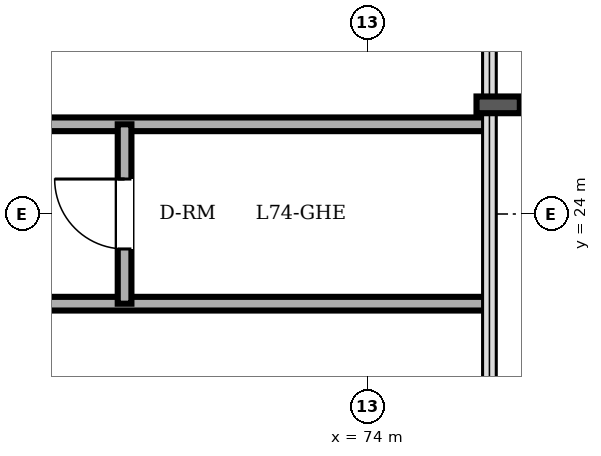
"""IFC4 building model, lengths in metres.
Left out: names, types, materials, properties, quantities, classifications, styles, units other than length and angle.
Written with IfcOpenShell. Run it as: python <this file> out.ifc"""

import sys

from ifc_helpers import new_model, si_unit, direction, frame, frame_2d, origin, place, context, subcontext, project, spatial, rectangle, extrude, element, fill, save


model = new_model("IFC4")
c1 = context("Model", 3, precision=1e-05, world=origin(), true_north=direction((0.0, 1.0)))
c2 = subcontext(c1, "Body", "Model", "MODEL_VIEW")
j1 = project(units=[si_unit("LENGTHUNIT", "METRE"), si_unit("PLANEANGLEUNIT", "RADIAN")], contexts=[c1])
p1 = place(None, origin())
s1 = spatial("IfcSite", under=j1, at=p1, CompositionType="ELEMENT")
p2 = place(p1, origin())
s2 = spatial("IfcBuilding", under=s1, at=p2, CompositionType="ELEMENT")
p3 = place(p2, frame((0.0, 0.0, 284.35)))
s3 = spatial("IfcBuildingStorey", under=s2, at=p3, CompositionType="ELEMENT", Elevation=284.35)
p4 = place(p3, frame((41.75, 22.82, 0.0), z_axis=(0.0, 0.0, 1.0), x_axis=(1.0, 0.0, 0.0)))
e1 = element("IfcWall", 1, at=p4, inside=s3, PredefinedType="PARTITIONING", context=c2, shape_type="SweptSolid", body=[
    extrude(rectangle(XDim=33.85, YDim=0.18, at=frame_2d((16.925, 0.0))), origin(), (0.0, 0.0, 1.0), 3.45),
])
p5 = place(p4, frame((2.53, 0.0, 0.0)))
e2 = element("IfcOpeningElement", 2, at=p5, cuts=e1, PredefinedType="OPENING", context=c2, shape_type="SweptSolid", body=[
    extrude(rectangle(XDim=0.92, YDim=2.1, at=frame_2d((0.46, 1.05))), frame((0.0, 0.1, 0.0), z_axis=(0.0, -1.0, 0.0), x_axis=(1.0, 0.0, 0.0)), (0.0, 0.0, 1.0), 0.2),
])
p6 = place(p4, frame((8.604, 0.0, 0.0)))
e3 = element("IfcOpeningElement", 3, at=p6, cuts=e1, PredefinedType="OPENING", context=c2, shape_type="SweptSolid", body=[
    extrude(rectangle(XDim=0.92, YDim=2.1, at=frame_2d((0.46, 1.05))), frame((0.0, 0.1, 0.0), z_axis=(0.0, -1.0, 0.0), x_axis=(1.0, 0.0, 0.0)), (0.0, 0.0, 1.0), 0.2),
])
p7 = place(p4, frame((14.065, 0.0, 0.0)))
e4 = element("IfcOpeningElement", 4, at=p7, cuts=e1, PredefinedType="OPENING", context=c2, shape_type="SweptSolid", body=[
    extrude(rectangle(XDim=0.92, YDim=2.1, at=frame_2d((0.46, 1.05))), frame((0.0, 0.1, 0.0), z_axis=(0.0, -1.0, 0.0), x_axis=(1.0, 0.0, 0.0)), (0.0, 0.0, 1.0), 0.2),
])
p8 = place(p4, frame((18.652, 0.0, 0.0)))
e5 = element("IfcOpeningElement", 5, at=p8, cuts=e1, PredefinedType="OPENING", context=c2, shape_type="SweptSolid", body=[
    extrude(rectangle(XDim=0.92, YDim=2.1, at=frame_2d((0.46, 1.05))), frame((0.0, 0.1, 0.0), z_axis=(0.0, -1.0, 0.0), x_axis=(1.0, 0.0, 0.0)), (0.0, 0.0, 1.0), 0.2),
])
p9 = place(p4, frame((24.986, 0.0, 0.0)))
e6 = element("IfcOpeningElement", 6, at=p9, cuts=e1, PredefinedType="OPENING", context=c2, shape_type="SweptSolid", body=[
    extrude(rectangle(XDim=0.92, YDim=2.1, at=frame_2d((0.46, 1.05))), frame((0.0, 0.1, 0.0), z_axis=(0.0, -1.0, 0.0), x_axis=(1.0, 0.0, 0.0)), (0.0, 0.0, 1.0), 0.2),
])
p10 = place(p3, frame((41.75, 25.18, 0.0), z_axis=(0.0, 0.0, 1.0), x_axis=(1.0, 0.0, 0.0)))
e7 = element("IfcWall", 7, at=p10, inside=s3, PredefinedType="PARTITIONING", context=c2, shape_type="SweptSolid", body=[
    extrude(rectangle(XDim=33.85, YDim=0.18, at=frame_2d((16.925, 0.0))), origin(), (0.0, 0.0, 1.0), 3.45),
])
p11 = place(p10, frame((2.484, 0.0, 0.0)))
e8 = element("IfcOpeningElement", 8, at=p11, cuts=e7, PredefinedType="OPENING", context=c2, shape_type="SweptSolid", body=[
    extrude(rectangle(XDim=0.92, YDim=2.1, at=frame_2d((0.46, 1.05))), frame((0.0, 0.1, 0.0), z_axis=(0.0, -1.0, 0.0), x_axis=(1.0, 0.0, 0.0)), (0.0, 0.0, 1.0), 0.2),
])
p12 = place(p10, frame((8.855, 0.0, 0.0)))
e9 = element("IfcOpeningElement", 9, at=p12, cuts=e7, PredefinedType="OPENING", context=c2, shape_type="SweptSolid", body=[
    extrude(rectangle(XDim=0.92, YDim=2.1, at=frame_2d((0.46, 1.05))), frame((0.0, 0.1, 0.0), z_axis=(0.0, -1.0, 0.0), x_axis=(1.0, 0.0, 0.0)), (0.0, 0.0, 1.0), 0.2),
])
p13 = place(p10, frame((18.012, 0.0, 0.0)))
e10 = element("IfcOpeningElement", 10, at=p13, cuts=e7, PredefinedType="OPENING", context=c2, shape_type="SweptSolid", body=[
    extrude(rectangle(XDim=0.92, YDim=2.1, at=frame_2d((0.46, 1.05))), frame((0.0, 0.1, 0.0), z_axis=(0.0, -1.0, 0.0), x_axis=(1.0, 0.0, 0.0)), (0.0, 0.0, 1.0), 0.2),
])
p14 = place(p10, frame((25.906, 0.0, 0.0)))
e11 = element("IfcOpeningElement", 11, at=p14, cuts=e7, PredefinedType="OPENING", context=c2, shape_type="SweptSolid", body=[
    extrude(rectangle(XDim=0.92, YDim=2.1, at=frame_2d((0.46, 1.05))), frame((0.0, 0.1, 0.0), z_axis=(0.0, -1.0, 0.0), x_axis=(1.0, 0.0, 0.0)), (0.0, 0.0, 1.0), 0.2),
])
p15 = place(p3, frame((70.8, 22.82, 0.0), z_axis=(0.0, 0.0, 1.0), x_axis=(0.0, 1.0, 0.0)))
e12 = element("IfcWall", 12, at=p15, inside=s3, PredefinedType="PARTITIONING", context=c2, shape_type="SweptSolid", body=[
    extrude(rectangle(XDim=2.36, YDim=0.18, at=frame_2d((1.18, 0.0))), origin(), (0.0, 0.0, 1.0), 3.45),
])
p16 = place(p15, frame((0.72, 0.0, 0.0)))
e13 = element("IfcOpeningElement", 13, at=p16, cuts=e12, PredefinedType="OPENING", context=c2, shape_type="SweptSolid", body=[
    extrude(rectangle(XDim=0.92, YDim=2.1, at=frame_2d((0.46, 1.05))), frame((0.0, 0.1, 0.0), z_axis=(0.0, -1.0, 0.0), x_axis=(1.0, 0.0, 0.0)), (0.0, 0.0, 1.0), 0.2),
])
p17 = place(p16, origin())
e14 = element("IfcDoor", 14, at=p17, inside=s3, OperationType="SINGLE_SWING_RIGHT", PredefinedType="DOOR", context=c2, shape_type="SweptSolid", body=[
    extrude(rectangle(XDim=0.92, YDim=2.1, at=frame_2d((0.46, 1.05))), frame((0.0, 0.025, 0.0), z_axis=(0.0, -1.0, 0.0), x_axis=(1.0, 0.0, 0.0)), (0.0, 0.0, 1.0), 0.05),
])
fill(e13, e14)
save(model, sys.argv[1])
